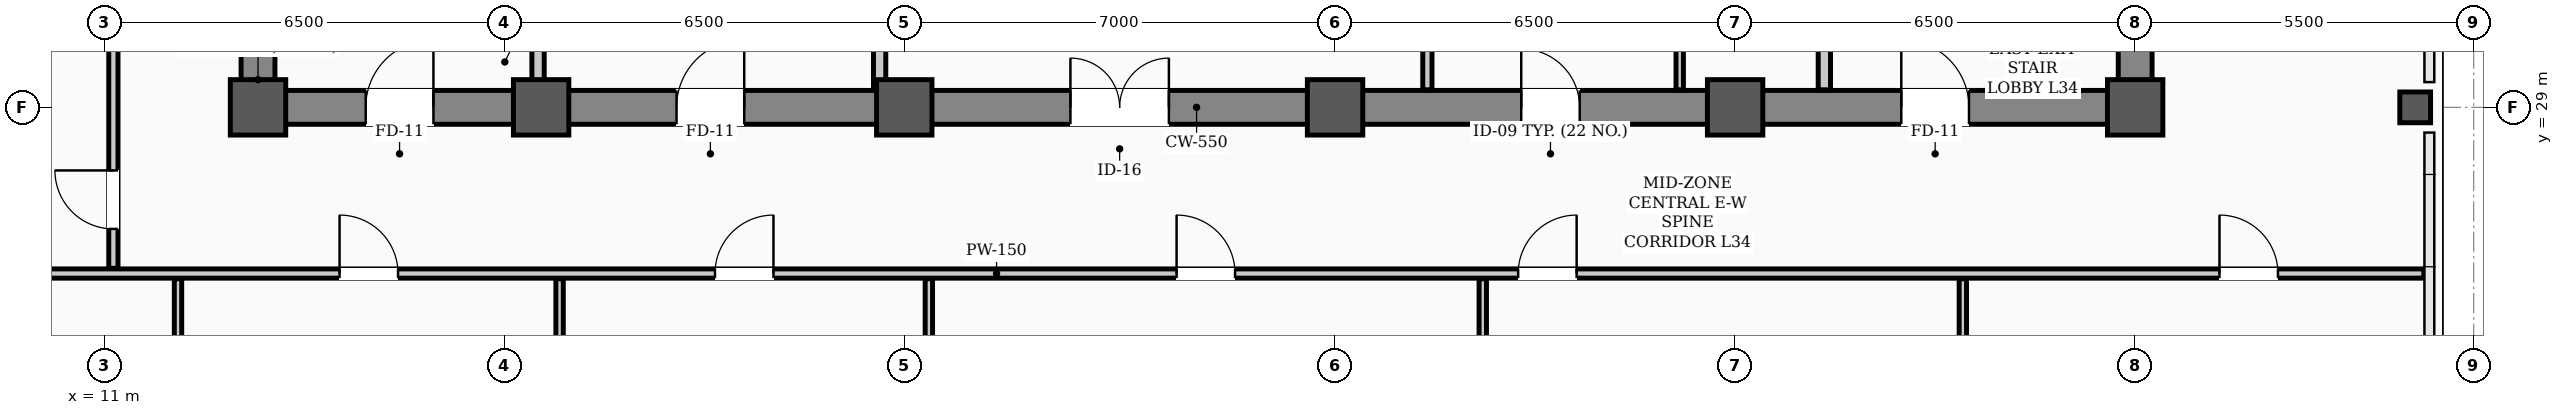
"""IFC4 building model, lengths in metres.
Left out: names, types, materials, properties, quantities, classifications, styles, units other than length and angle.
Written with IfcOpenShell. Run it as: python <this file> out.ifc"""

import sys

from ifc_helpers import new_model, si_unit, direction, frame, frame_2d, origin, origin_2d, place, context, subcontext, project, spatial, rectangle, hollow_rectangle, extrude, element, fill, save


model = new_model("IFC4")
c1 = context("Model", 3, precision=1e-05, world=origin(), true_north=direction((0.0, 1.0)))
c2 = subcontext(c1, "Body", "Model", "MODEL_VIEW")
j1 = project(units=[si_unit("LENGTHUNIT", "METRE"), si_unit("PLANEANGLEUNIT", "RADIAN")], contexts=[c1])
p1 = place(None, origin())
s1 = spatial("IfcSite", under=j1, at=p1, CompositionType="ELEMENT")
p2 = place(p1, origin())
s2 = spatial("IfcBuilding", under=s1, at=p2, CompositionType="ELEMENT")
p3 = place(p2, frame((0.0, 0.0, 138.3)))
s3 = spatial("IfcBuildingStorey", under=s2, at=p3, CompositionType="ELEMENT", Elevation=138.3)
for number, where, z_axis, x_axis in (
    (1, (13.5, 29.0, 0.0), (0.0, 0.0, 1.0), (1.0, 0.0, 0.0)),
    (2, (18.1, 29.0, 0.0), (0.0, 0.0, 1.0), (1.0, 0.0, 0.0)),
    (3, (24.0, 29.0, 0.0), (0.0, 0.0, 1.0), (1.0, 0.0, 0.0)),
    (4, (31.0, 29.0, 0.0), (0.0, 0.0, 1.0), (1.0, 0.0, 0.0)),
    (5, (37.5, 29.0, 0.0), (0.0, 0.0, 1.0), (1.0, 0.0, 0.0)),
    (6, (44.0, 29.0, 0.0), (0.0, 0.0, 1.0), (1.0, 0.0, 0.0)),
):
    element("IfcColumn", number, at=place(p3, frame(where, z_axis=z_axis, x_axis=x_axis)), inside=s3, PredefinedType="COLUMN", context=c2, shape_type="SweptSolid", body=[
        extrude(hollow_rectangle(XDim=0.9, YDim=0.9, WallThickness=0.035, InnerFilletRadius=0.017, OuterFilletRadius=0.052, at=origin_2d()), origin(), (0.0, 0.0, 1.0), 3.9),
    ])
p4 = place(p3, frame((48.55, 29.0, 0.0), z_axis=(0.0, 0.0, 1.0), x_axis=(1.0, 0.0, 0.0)))
e7 = element("IfcColumn", 7, at=p4, inside=s3, PredefinedType="COLUMN", context=c2, shape_type="SweptSolid", body=[
    extrude(hollow_rectangle(XDim=0.5, YDim=0.5, WallThickness=0.024, InnerFilletRadius=0.012, OuterFilletRadius=0.036, at=origin_2d()), origin(), (0.0, 0.0, 1.0), 3.9),
])
p5 = place(p3, frame((13.5, 29.0, 0.0), z_axis=(0.0, 0.0, 1.0), x_axis=(1.0, 0.0, 0.0)))
e8 = element("IfcWall", 8, at=p5, inside=s3, PredefinedType="SHEAR", context=c2, shape_type="SweptSolid", body=[
    extrude(rectangle(XDim=30.5, YDim=0.55, at=frame_2d((15.25, 0.0))), origin(), (0.0, 0.0, 1.0), 3.66),
])
p6 = place(p5, frame((1.75, 0.0, 0.0)))
e9 = element("IfcOpeningElement", 9, at=p6, cuts=e8, PredefinedType="OPENING", context=c2, shape_type="SweptSolid", body=[
    extrude(rectangle(XDim=1.1, YDim=2.08, at=frame_2d((0.55, 1.04))), frame((0.0, 0.285, 0.0), z_axis=(0.0, -1.0, 0.0), x_axis=(1.0, 0.0, 0.0)), (0.0, 0.0, 1.0), 0.57),
])
p7 = place(p5, frame((26.7, 0.0, 0.0)))
e10 = element("IfcOpeningElement", 10, at=p7, cuts=e8, PredefinedType="OPENING", context=c2, shape_type="SweptSolid", body=[
    extrude(rectangle(XDim=1.1, YDim=2.08, at=frame_2d((0.55, 1.04))), frame((0.0, 0.285, 0.0), z_axis=(0.0, -1.0, 0.0), x_axis=(1.0, 0.0, 0.0)), (0.0, 0.0, 1.0), 0.57),
])
p8 = place(p5, frame((6.8, 0.0, 0.0)))
e11 = element("IfcOpeningElement", 11, at=p8, cuts=e8, PredefinedType="OPENING", context=c2, shape_type="SweptSolid", body=[
    extrude(rectangle(XDim=1.1, YDim=2.08, at=frame_2d((0.55, 1.04))), frame((0.0, 0.285, 0.0), z_axis=(0.0, -1.0, 0.0), x_axis=(1.0, 0.0, 0.0)), (0.0, 0.0, 1.0), 0.57),
])
p9 = place(p5, frame((13.2, 0.0, 0.0)))
e12 = element("IfcOpeningElement", 12, at=p9, cuts=e8, PredefinedType="OPENING", context=c2, shape_type="SweptSolid", body=[
    extrude(rectangle(XDim=1.6, YDim=2.08, at=frame_2d((0.8, 1.04))), frame((0.0, 0.285, 0.0), z_axis=(0.0, -1.0, 0.0), x_axis=(1.0, 0.0, 0.0)), (0.0, 0.0, 1.0), 0.57),
])
p10 = place(p5, frame((20.525, 0.0, 0.0)))
e13 = element("IfcOpeningElement", 13, at=p10, cuts=e8, PredefinedType="OPENING", context=c2, shape_type="SweptSolid", body=[
    extrude(rectangle(XDim=0.95, YDim=2.08, at=frame_2d((0.475, 1.04))), frame((0.0, 0.285, 0.0), z_axis=(0.0, -1.0, 0.0), x_axis=(1.0, 0.0, 0.0)), (0.0, 0.0, 1.0), 0.57),
])
for number, where, z_axis, x_axis in (
    (14, (13.5, 29.35, 0.0), (0.0, 0.0, 1.0), (0.0, 1.0, 0.0)),
    (15, (44.0, 29.35, 0.0), (0.0, 0.0, 1.0), (0.0, 1.0, 0.0)),
):
    element("IfcWall", number, at=place(p3, frame(where, z_axis=z_axis, x_axis=x_axis)), inside=s3, PredefinedType="SHEAR", context=c2, shape_type="SweptSolid", body=[
        extrude(rectangle(XDim=8.6, YDim=0.55, at=frame_2d((4.3, 0.0))), origin(), (0.0, 0.0, 1.0), 3.66),
    ])
p11 = place(p3, frame((2.31, 26.3, 0.0), z_axis=(0.0, 0.0, 1.0), x_axis=(1.0, 0.0, 0.0)))
e16 = element("IfcWall", 16, at=p11, inside=s3, PredefinedType="PARTITIONING", context=c2, shape_type="SweptSolid", body=[
    extrude(rectangle(XDim=46.38, YDim=0.15, at=frame_2d((23.19, 0.0))), origin(), (0.0, 0.0, 1.0), 2.24),
])
p12 = place(p11, frame((12.515, 0.0, 0.0)))
e17 = element("IfcOpeningElement", 17, at=p12, cuts=e16, PredefinedType="OPENING", context=c2, shape_type="SweptSolid", body=[
    extrude(rectangle(XDim=0.95, YDim=2.08, at=frame_2d((0.475, 1.04))), frame((0.0, 0.085, 0.0), z_axis=(0.0, -1.0, 0.0), x_axis=(1.0, 0.0, 0.0)), (0.0, 0.0, 1.0), 0.17),
])
p13 = place(p11, frame((18.615, 0.0, 0.0)))
e18 = element("IfcOpeningElement", 18, at=p13, cuts=e16, PredefinedType="OPENING", context=c2, shape_type="SweptSolid", body=[
    extrude(rectangle(XDim=0.95, YDim=2.08, at=frame_2d((0.475, 1.04))), frame((0.0, 0.085, 0.0), z_axis=(0.0, -1.0, 0.0), x_axis=(1.0, 0.0, 0.0)), (0.0, 0.0, 1.0), 0.17),
])
p14 = place(p11, frame((26.115, 0.0, 0.0)))
e19 = element("IfcOpeningElement", 19, at=p14, cuts=e16, PredefinedType="OPENING", context=c2, shape_type="SweptSolid", body=[
    extrude(rectangle(XDim=0.95, YDim=2.08, at=frame_2d((0.475, 1.04))), frame((0.0, 0.085, 0.0), z_axis=(0.0, -1.0, 0.0), x_axis=(1.0, 0.0, 0.0)), (0.0, 0.0, 1.0), 0.17),
])
p15 = place(p11, frame((31.665, 0.0, 0.0)))
e20 = element("IfcOpeningElement", 20, at=p15, cuts=e16, PredefinedType="OPENING", context=c2, shape_type="SweptSolid", body=[
    extrude(rectangle(XDim=0.95, YDim=2.08, at=frame_2d((0.475, 1.04))), frame((0.0, 0.085, 0.0), z_axis=(0.0, -1.0, 0.0), x_axis=(1.0, 0.0, 0.0)), (0.0, 0.0, 1.0), 0.17),
])
p16 = place(p11, frame((43.06, 0.0, 0.0)))
e21 = element("IfcOpeningElement", 21, at=p16, cuts=e16, PredefinedType="OPENING", context=c2, shape_type="SweptSolid", body=[
    extrude(rectangle(XDim=0.95, YDim=2.08, at=frame_2d((0.475, 1.04))), frame((0.0, 0.085, 0.0), z_axis=(0.0, -1.0, 0.0), x_axis=(1.0, 0.0, 0.0)), (0.0, 0.0, 1.0), 0.17),
])
for number, where, z_axis, x_axis in (
    (22, (18.05, 29.285, 0.0), (0.0, 0.0, 1.0), (0.0, 1.0, 0.0)),
    (23, (38.95, 29.285, 0.0), (0.0, 0.0, 1.0), (0.0, 1.0, 0.0)),
):
    element("IfcWall", number, at=place(p3, frame(where, z_axis=z_axis, x_axis=x_axis)), inside=s3, PredefinedType="STANDARD", context=c2, shape_type="SweptSolid", body=[
        extrude(rectangle(XDim=1.015, YDim=0.2, at=frame_2d((0.508, 0.0))), origin(), (0.0, 0.0, 1.0), 2.24),
    ])
p17 = place(p3, frame((23.6, 29.285, 0.0), z_axis=(0.0, 0.0, 1.0), x_axis=(0.0, 1.0, 0.0)))
e24 = element("IfcWall", 24, at=p17, inside=s3, PredefinedType="STANDARD", context=c2, shape_type="SweptSolid", body=[
    extrude(rectangle(XDim=5.415, YDim=0.2, at=frame_2d((2.708, 0.0))), origin(), (0.0, 0.0, 1.0), 2.24),
])
p18 = place(p3, frame((32.5, 29.285, 0.0), z_axis=(0.0, 0.0, 1.0), x_axis=(0.0, 1.0, 0.0)))
e25 = element("IfcWall", 25, at=p18, inside=s3, PredefinedType="PARTITIONING", context=c2, shape_type="SweptSolid", body=[
    extrude(rectangle(XDim=2.48, YDim=0.15, at=frame_2d((1.24, 0.0))), origin(), (0.0, 0.0, 1.0), 2.24),
])
p19 = place(p3, frame((36.6, 29.285, 0.0), z_axis=(0.0, 0.0, 1.0), x_axis=(0.0, 1.0, 0.0)))
e26 = element("IfcWall", 26, at=p19, inside=s3, PredefinedType="PARTITIONING", context=c2, shape_type="SweptSolid", body=[
    extrude(rectangle(XDim=2.48, YDim=0.12, at=frame_2d((1.24, 0.0))), origin(), (0.0, 0.0, 1.0), 2.24),
])
p20 = place(p3, frame((11.15, 26.385, 0.0), z_axis=(0.0, 0.0, 1.0), x_axis=(0.0, 1.0, 0.0)))
e27 = element("IfcWall", 27, at=p20, inside=s3, PredefinedType="PARTITIONING", context=c2, shape_type="SweptSolid", body=[
    extrude(rectangle(XDim=11.28, YDim=0.15, at=frame_2d((5.64, 0.0))), origin(), (0.0, 0.0, 1.0), 2.24),
])
p21 = place(p20, frame((0.64, 0.0, 0.0)))
e28 = element("IfcOpeningElement", 28, at=p21, cuts=e27, PredefinedType="OPENING", context=c2, shape_type="SweptSolid", body=[
    extrude(rectangle(XDim=0.95, YDim=2.08, at=frame_2d((0.475, 1.04))), frame((0.0, 0.085, 0.0), z_axis=(0.0, -1.0, 0.0), x_axis=(1.0, 0.0, 0.0)), (0.0, 0.0, 1.0), 0.17),
])
p22 = place(p20, frame((8.765, 0.0, 0.0)))
e29 = element("IfcOpeningElement", 29, at=p22, cuts=e27, PredefinedType="OPENING", context=c2, shape_type="SweptSolid", body=[
    extrude(rectangle(XDim=0.95, YDim=2.08, at=frame_2d((0.475, 1.04))), frame((0.0, 0.085, 0.0), z_axis=(0.0, -1.0, 0.0), x_axis=(1.0, 0.0, 0.0)), (0.0, 0.0, 1.0), 0.17),
])
p23 = place(p3, frame((12.2, 10.81, 0.0), z_axis=(0.0, 0.0, 1.0), x_axis=(0.0, 1.0, 0.0)))
e30 = element("IfcWall", 30, at=p23, inside=s3, PredefinedType="PARTITIONING", context=c2, shape_type="SweptSolid", body=[
    extrude(rectangle(XDim=15.405, YDim=0.12, at=frame_2d((7.703, 0.0))), origin(), (0.0, 0.0, 1.0), 2.24),
])
p24 = place(p23, frame((13.415, 0.0, 0.0)))
e31 = element("IfcOpeningElement", 31, at=p24, cuts=e30, PredefinedType="OPENING", context=c2, shape_type="SweptSolid", body=[
    extrude(rectangle(XDim=0.95, YDim=2.08, at=frame_2d((0.475, 1.04))), frame((0.0, 0.07, 0.0), z_axis=(0.0, -1.0, 0.0), x_axis=(1.0, 0.0, 0.0)), (0.0, 0.0, 1.0), 0.14),
])
p25 = place(p3, frame((18.4, 10.81, 0.0), z_axis=(0.0, 0.0, 1.0), x_axis=(0.0, 1.0, 0.0)))
e32 = element("IfcWall", 32, at=p25, inside=s3, PredefinedType="PARTITIONING", context=c2, shape_type="SweptSolid", body=[
    extrude(rectangle(XDim=15.405, YDim=0.12, at=frame_2d((7.703, 0.0))), origin(), (0.0, 0.0, 1.0), 2.24),
])
p26 = place(p3, frame((24.4, 12.57, 0.0), z_axis=(0.0, 0.0, 1.0), x_axis=(0.0, 1.0, 0.0)))
e33 = element("IfcWall", 33, at=p26, inside=s3, PredefinedType="PARTITIONING", context=c2, shape_type="SweptSolid", body=[
    extrude(rectangle(XDim=13.645, YDim=0.12, at=frame_2d((6.823, 0.0))), origin(), (0.0, 0.0, 1.0), 2.24),
])
for number, where, z_axis, x_axis in (
    (34, (33.4, 10.81, 0.0), (0.0, 0.0, 1.0), (0.0, 1.0, 0.0)),
    (35, (41.2, 10.81, 0.0), (0.0, 0.0, 1.0), (0.0, 1.0, 0.0)),
):
    element("IfcWall", number, at=place(p3, frame(where, z_axis=z_axis, x_axis=x_axis)), inside=s3, PredefinedType="PARTITIONING", context=c2, shape_type="SweptSolid", body=[
        extrude(rectangle(XDim=15.405, YDim=0.12, at=frame_2d((7.703, 0.0))), origin(), (0.0, 0.0, 1.0), 2.24),
    ])
p27 = place(p6, origin())
e36 = element("IfcDoor", 36, at=p27, inside=s3, OperationType="SINGLE_SWING_RIGHT", PredefinedType="DOOR", context=c2, shape_type="SweptSolid", body=[
    extrude(rectangle(XDim=1.1, YDim=2.08, at=frame_2d((0.55, 1.04))), frame((0.0, 0.025, 0.0), z_axis=(0.0, -1.0, 0.0), x_axis=(1.0, 0.0, 0.0)), (0.0, 0.0, 1.0), 0.05),
])
fill(e9, e36)
p28 = place(p7, origin())
e37 = element("IfcDoor", 37, at=p28, inside=s3, OperationType="SINGLE_SWING_LEFT", PredefinedType="DOOR", context=c2, shape_type="SweptSolid", body=[
    extrude(rectangle(XDim=1.1, YDim=2.08, at=frame_2d((0.55, 1.04))), frame((0.0, 0.025, 0.0), z_axis=(0.0, -1.0, 0.0), x_axis=(1.0, 0.0, 0.0)), (0.0, 0.0, 1.0), 0.05),
])
fill(e10, e37)
p29 = place(p8, origin())
e38 = element("IfcDoor", 38, at=p29, inside=s3, OperationType="SINGLE_SWING_RIGHT", PredefinedType="DOOR", context=c2, shape_type="SweptSolid", body=[
    extrude(rectangle(XDim=1.1, YDim=2.08, at=frame_2d((0.55, 1.04))), frame((0.0, 0.025, 0.0), z_axis=(0.0, -1.0, 0.0), x_axis=(1.0, 0.0, 0.0)), (0.0, 0.0, 1.0), 0.05),
])
fill(e11, e38)
p30 = place(p9, origin())
e39 = element("IfcDoor", 39, at=p30, inside=s3, OperationType="DOUBLE_DOOR_SINGLE_SWING", PredefinedType="DOOR", context=c2, shape_type="SweptSolid", body=[
    extrude(rectangle(XDim=1.6, YDim=2.08, at=frame_2d((0.8, 1.04))), frame((0.0, 0.025, 0.0), z_axis=(0.0, -1.0, 0.0), x_axis=(1.0, 0.0, 0.0)), (0.0, 0.0, 1.0), 0.05),
])
fill(e12, e39)
p31 = place(p10, origin())
e40 = element("IfcDoor", 40, at=p31, inside=s3, OperationType="SINGLE_SWING_LEFT", PredefinedType="DOOR", context=c2, shape_type="SweptSolid", body=[
    extrude(rectangle(XDim=0.95, YDim=2.08, at=frame_2d((0.475, 1.04))), frame((0.0, 0.025, 0.0), z_axis=(0.0, -1.0, 0.0), x_axis=(1.0, 0.0, 0.0)), (0.0, 0.0, 1.0), 0.05),
])
fill(e13, e40)
p32 = place(p12, origin())
e41 = element("IfcDoor", 41, at=p32, inside=s3, OperationType="SINGLE_SWING_LEFT", PredefinedType="DOOR", context=c2, shape_type="SweptSolid", body=[
    extrude(rectangle(XDim=0.95, YDim=2.08, at=frame_2d((0.475, 1.04))), frame((0.0, 0.025, 0.0), z_axis=(0.0, -1.0, 0.0), x_axis=(1.0, 0.0, 0.0)), (0.0, 0.0, 1.0), 0.05),
])
fill(e17, e41)
p33 = place(p13, origin())
e42 = element("IfcDoor", 42, at=p33, inside=s3, OperationType="SINGLE_SWING_RIGHT", PredefinedType="DOOR", context=c2, shape_type="SweptSolid", body=[
    extrude(rectangle(XDim=0.95, YDim=2.08, at=frame_2d((0.475, 1.04))), frame((0.0, 0.025, 0.0), z_axis=(0.0, -1.0, 0.0), x_axis=(1.0, 0.0, 0.0)), (0.0, 0.0, 1.0), 0.05),
])
fill(e18, e42)
p34 = place(p14, origin())
e43 = element("IfcDoor", 43, at=p34, inside=s3, OperationType="SINGLE_SWING_LEFT", PredefinedType="DOOR", context=c2, shape_type="SweptSolid", body=[
    extrude(rectangle(XDim=0.95, YDim=2.08, at=frame_2d((0.475, 1.04))), frame((0.0, 0.025, 0.0), z_axis=(0.0, -1.0, 0.0), x_axis=(1.0, 0.0, 0.0)), (0.0, 0.0, 1.0), 0.05),
])
fill(e19, e43)
p35 = place(p15, origin())
e44 = element("IfcDoor", 44, at=p35, inside=s3, OperationType="SINGLE_SWING_RIGHT", PredefinedType="DOOR", context=c2, shape_type="SweptSolid", body=[
    extrude(rectangle(XDim=0.95, YDim=2.08, at=frame_2d((0.475, 1.04))), frame((0.0, 0.025, 0.0), z_axis=(0.0, -1.0, 0.0), x_axis=(1.0, 0.0, 0.0)), (0.0, 0.0, 1.0), 0.05),
])
fill(e20, e44)
p36 = place(p16, origin())
e45 = element("IfcDoor", 45, at=p36, inside=s3, OperationType="SINGLE_SWING_LEFT", PredefinedType="DOOR", context=c2, shape_type="SweptSolid", body=[
    extrude(rectangle(XDim=0.95, YDim=2.08, at=frame_2d((0.475, 1.04))), frame((0.0, 0.025, 0.0), z_axis=(0.0, -1.0, 0.0), x_axis=(1.0, 0.0, 0.0)), (0.0, 0.0, 1.0), 0.05),
])
fill(e21, e45)
p37 = place(p21, origin())
e46 = element("IfcDoor", 46, at=p37, inside=s3, OperationType="SINGLE_SWING_RIGHT", PredefinedType="DOOR", context=c2, shape_type="SweptSolid", body=[
    extrude(rectangle(XDim=0.95, YDim=2.08, at=frame_2d((0.475, 1.04))), frame((0.0, 0.025, 0.0), z_axis=(0.0, -1.0, 0.0), x_axis=(1.0, 0.0, 0.0)), (0.0, 0.0, 1.0), 0.05),
])
fill(e28, e46)
save(model, sys.argv[1])
